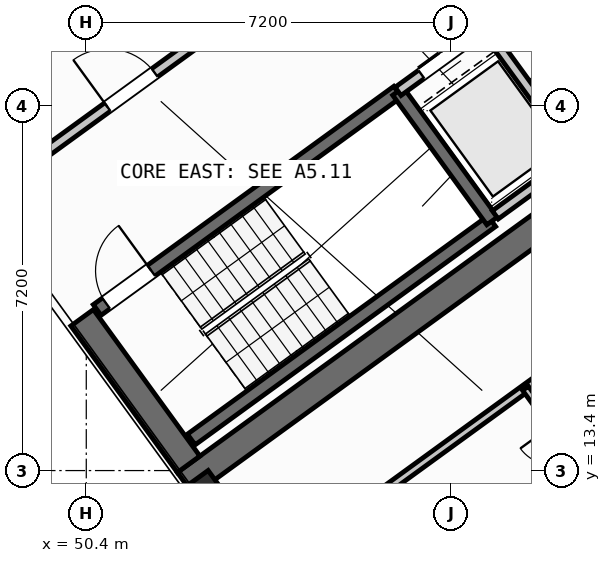
"""IFC4 building model, lengths in metres.
Left out: names, types, materials, properties, quantities, classifications, styles, units other than length and angle.
Written with IfcOpenShell. Run it as: python <this file> out.ifc"""

import sys

from ifc_helpers import new_model, si_unit, direction, frame, frame_2d, origin, origin_2d, place, context, subcontext, project, spatial, rectangle, hollow_rectangle, extrude, source, transform, mapped, element, fill, save


model = new_model("IFC4")
c1 = context("Model", 3, precision=1e-05, world=origin(), true_north=direction((0.0, 1.0)))
c2 = subcontext(c1, "Body", "Model", "MODEL_VIEW")
j1 = project(units=[si_unit("LENGTHUNIT", "METRE"), si_unit("PLANEANGLEUNIT", "RADIAN")], contexts=[c1])
p1 = place(None, origin())
s1 = spatial("IfcSite", under=j1, at=p1, CompositionType="ELEMENT")
p2 = place(p1, origin())
s2 = spatial("IfcBuilding", under=s1, at=p2, CompositionType="ELEMENT")
p3 = place(p2, frame((0.0, 0.0, 132.6)))
s3 = spatial("IfcBuildingStorey", under=s2, at=p3, CompositionType="ELEMENT", Elevation=132.6)
p4 = place(p3, frame((52.359, 13.14, 0.0), z_axis=(0.0, 0.0, 1.0), x_axis=(0.809014896919, 0.587788139183, 0.0)))
e1 = element("IfcWall", 1, at=p4, inside=s3, PredefinedType="SHEAR", context=c2, shape_type="SweptSolid", body=[
    extrude(rectangle(XDim=12.34, YDim=0.55, at=frame_2d((6.17, 0.0))), origin(), (0.0, 0.0, 1.0), 3.32),
])
p5 = place(p3, frame((52.42, 13.524, 0.0), z_axis=(0.0, 0.0, 1.0), x_axis=(-0.587802113096, 0.809004744015, 0.0)))
e2 = element("IfcWall", 2, at=p5, inside=s3, PredefinedType="SHEAR", context=c2, shape_type="SweptSolid", body=[
    extrude(rectangle(XDim=3.575, YDim=0.55, at=frame_2d((1.788, 0.0))), origin(), (0.0, 0.0, 1.0), 3.32),
])
m1 = source(origin(), c2, "Body", "SweptSolid", [
    extrude(hollow_rectangle(XDim=0.9, YDim=0.9, WallThickness=0.036, at=origin_2d()), origin(), (0.0, 0.0, 1.0), 3.6),
])
p6 = place(p3, frame((52.705, 12.773, 0.0), z_axis=(0.0, 0.0, 1.0), x_axis=(0.809016994375, 0.587785252292, 0.0)))
e3 = element("IfcColumn", 3, at=p6, inside=s3, PredefinedType="COLUMN", context=c2, shape_type="MappedRepresentation", body=[
    mapped(m1, transform((0.0, 0.0, 0.0), scale=1.0)),
])
p7 = place(p3, frame((58.455, 35.484, 0.0), z_axis=(0.0, 0.0, 1.0), x_axis=(0.587783625747, -0.809018176127, 0.0)))
e4 = element("IfcWall", 4, at=p7, inside=s3, PredefinedType="STANDARD", context=c2, shape_type="SweptSolid", body=[
    extrude(rectangle(XDim=21.587, YDim=0.32, at=frame_2d((10.794, 0.0))), origin(), (0.0, 0.0, 1.0), 2.745),
])
p8 = place(p7, frame((1.475, 0.0, 0.8)))
e5 = element("IfcOpeningElement", 5, at=p8, cuts=e4, PredefinedType="OPENING", context=c2, shape_type="SweptSolid", body=[
    extrude(rectangle(XDim=2.1, YDim=1.55, at=frame_2d((1.05, 0.775))), frame((0.0, 0.17, 0.0), z_axis=(0.0, -1.0, 0.0), x_axis=(1.0, 0.0, 0.0)), (0.0, 0.0, 1.0), 0.34),
])
p9 = place(p7, frame((5.13, 0.0, 0.85)))
e6 = element("IfcOpeningElement", 6, at=p9, cuts=e4, PredefinedType="OPENING", context=c2, shape_type="SweptSolid", body=[
    extrude(rectangle(XDim=1.5, YDim=1.5, at=frame_2d((0.75, 0.75))), frame((0.0, 0.17, 0.0), z_axis=(0.0, -1.0, 0.0), x_axis=(1.0, 0.0, 0.0)), (0.0, 0.0, 1.0), 0.34),
])
p10 = place(p7, frame((8.929, 0.0, 0.85)))
e7 = element("IfcOpeningElement", 7, at=p10, cuts=e4, PredefinedType="OPENING", context=c2, shape_type="SweptSolid", body=[
    extrude(rectangle(XDim=1.5, YDim=1.5, at=frame_2d((0.75, 0.75))), frame((0.0, 0.17, 0.0), z_axis=(0.0, -1.0, 0.0), x_axis=(1.0, 0.0, 0.0)), (0.0, 0.0, 1.0), 0.34),
])
p11 = place(p7, frame((17.581, 0.0, 0.95)))
e8 = element("IfcOpeningElement", 8, at=p11, cuts=e4, PredefinedType="OPENING", context=c2, shape_type="SweptSolid", body=[
    extrude(rectangle(XDim=1.2, YDim=1.4, at=frame_2d((0.6, 0.7))), frame((0.0, 0.17, 0.0), z_axis=(0.0, -1.0, 0.0), x_axis=(1.0, 0.0, 0.0)), (0.0, 0.0, 1.0), 0.34),
])
p12 = place(p3, frame((71.098, 17.731, 0.0), z_axis=(0.0, 0.0, 1.0), x_axis=(-0.809021120468, -0.587779573171, 0.0)))
e9 = element("IfcWall", 9, at=p12, inside=s3, PredefinedType="STANDARD", context=c2, shape_type="SweptSolid", body=[
    extrude(rectangle(XDim=17.588, YDim=0.32, at=frame_2d((8.794, 0.0))), origin(), (0.0, 0.0, 1.0), 3.32),
])
p13 = place(p12, frame((1.624, 0.0, 0.0)))
e10 = element("IfcOpeningElement", 10, at=p13, cuts=e9, PredefinedType="OPENING", context=c2, shape_type="SweptSolid", body=[
    extrude(rectangle(XDim=1.05, YDim=2.15, at=frame_2d((0.525, 1.075))), frame((0.0, 0.17, 0.0), z_axis=(0.0, -1.0, 0.0), x_axis=(1.0, 0.0, 0.0)), (0.0, 0.0, 1.0), 0.34),
])
p14 = place(p12, frame((4.104, 0.0, 1.0)))
e11 = element("IfcOpeningElement", 11, at=p14, cuts=e9, PredefinedType="OPENING", context=c2, shape_type="SweptSolid", body=[
    extrude(rectangle(XDim=0.9, YDim=1.25, at=frame_2d((0.45, 0.625))), frame((0.0, 0.17, 0.0), z_axis=(0.0, -1.0, 0.0), x_axis=(1.0, 0.0, 0.0)), (0.0, 0.0, 1.0), 0.34),
])
p15 = place(p12, frame((7.879, 0.0, 0.85)))
e12 = element("IfcOpeningElement", 12, at=p15, cuts=e9, PredefinedType="OPENING", context=c2, shape_type="SweptSolid", body=[
    extrude(rectangle(XDim=1.8, YDim=1.5, at=frame_2d((0.9, 0.75))), frame((0.0, 0.17, 0.0), z_axis=(0.0, -1.0, 0.0), x_axis=(1.0, 0.0, 0.0)), (0.0, 0.0, 1.0), 0.34),
])
p16 = place(p12, frame((12.849, 0.0, 0.85)))
e13 = element("IfcOpeningElement", 13, at=p16, cuts=e9, PredefinedType="OPENING", context=c2, shape_type="SweptSolid", body=[
    extrude(rectangle(XDim=1.8, YDim=1.5, at=frame_2d((0.9, 0.75))), frame((0.0, 0.17, 0.0), z_axis=(0.0, -1.0, 0.0), x_axis=(1.0, 0.0, 0.0)), (0.0, 0.0, 1.0), 0.34),
])
p17 = place(p3, frame((52.472, 14.013, 0.0), z_axis=(0.0, 0.0, 1.0), x_axis=(0.809028366311, 0.587769599847, 0.0)))
e14 = element("IfcWall", 14, at=p17, inside=s3, PredefinedType="SHEAR", context=c2, shape_type="SweptSolid", body=[
    extrude(rectangle(XDim=7.33, YDim=0.26, at=frame_2d((3.665, 0.0))), origin(), (0.0, 0.0, 1.0), 3.32),
])
p18 = place(p3, frame((50.615, 16.57, 0.0), z_axis=(0.0, 0.0, 1.0), x_axis=(0.809028366311, 0.587769599847, 0.0)))
e15 = element("IfcWall", 15, at=p18, inside=s3, PredefinedType="SHEAR", context=c2, shape_type="SweptSolid", body=[
    extrude(rectangle(XDim=7.33, YDim=0.26, at=frame_2d((3.665, 0.0))), origin(), (0.0, 0.0, 1.0), 3.32),
])
p19 = place(p18, frame((0.22, 0.0, 0.0)))
e16 = element("IfcOpeningElement", 16, at=p19, cuts=e15, PredefinedType="OPENING", context=c2, shape_type="SweptSolid", body=[
    extrude(rectangle(XDim=1.1, YDim=2.1, at=frame_2d((0.55, 1.05))), frame((0.0, 0.14, 0.0), z_axis=(0.0, -1.0, 0.0), x_axis=(1.0, 0.0, 0.0)), (0.0, 0.0, 1.0), 0.28),
])
p20 = place(p3, frame((58.41, 18.327, 0.0), z_axis=(0.0, 0.0, 1.0), x_axis=(-0.58776738483, 0.809029975545, 0.0)))
e17 = element("IfcWall", 17, at=p20, inside=s3, PredefinedType="SHEAR", context=c2, shape_type="SweptSolid", body=[
    extrude(rectangle(XDim=3.16, YDim=0.26, at=frame_2d((1.58, 0.0))), origin(), (0.0, 0.0, 1.0), 3.32),
])
p21 = place(p3, frame((47.065, 21.407, 0.0), z_axis=(0.0, 0.0, 1.0), x_axis=(0.809032984992, 0.587763242466, 0.0)))
e18 = element("IfcWall", 18, at=p21, inside=s3, PredefinedType="STANDARD", context=c2, shape_type="SweptSolid", body=[
    extrude(rectangle(XDim=3.448, YDim=0.2, at=frame_2d((1.724, 0.0))), origin(), (0.0, 0.0, 1.0), 3.31),
])
p22 = place(p21, frame((0.458, 0.0, 0.0)))
e19 = element("IfcOpeningElement", 19, at=p22, cuts=e18, PredefinedType="OPENING", context=c2, shape_type="SweptSolid", body=[
    extrude(rectangle(XDim=1.3, YDim=2.2, at=frame_2d((0.65, 1.1))), frame((0.0, 0.11, 0.0), z_axis=(0.0, -1.0, 0.0), x_axis=(1.0, 0.0, 0.0)), (0.0, 0.0, 1.0), 0.22),
])
p23 = place(p3, frame((48.758, 19.077, 0.0), z_axis=(0.0, 0.0, 1.0), x_axis=(0.809005065155, 0.587801671104, 0.0)))
e20 = element("IfcWall", 20, at=p23, inside=s3, PredefinedType="STANDARD", context=c2, shape_type="SweptSolid", body=[
    extrude(rectangle(XDim=5.768, YDim=0.2, at=frame_2d((2.884, 0.0))), origin(), (0.0, 0.0, 1.0), 3.31),
])
p24 = place(p23, frame((2.548, 0.0, 0.0)))
e21 = element("IfcOpeningElement", 21, at=p24, cuts=e20, PredefinedType="OPENING", context=c2, shape_type="SweptSolid", body=[
    extrude(rectangle(XDim=1.15, YDim=2.1, at=frame_2d((0.575, 1.05))), frame((0.0, 0.11, 0.0), z_axis=(0.0, -1.0, 0.0), x_axis=(1.0, 0.0, 0.0)), (0.0, 0.0, 1.0), 0.22),
])
p25 = place(p3, frame((56.553, 20.884, 0.0), z_axis=(0.0, 0.0, 1.0), x_axis=(0.809023564264, 0.58777620951, 0.0)))
e22 = element("IfcWall", 22, at=p25, inside=s3, PredefinedType="STANDARD", context=c2, shape_type="SweptSolid", body=[
    extrude(rectangle(XDim=3.818, YDim=0.2, at=frame_2d((1.909, 0.0))), origin(), (0.0, 0.0, 1.0), 3.31),
])
p26 = place(p25, frame((0.57, 0.0, 0.0)))
e23 = element("IfcOpeningElement", 23, at=p26, cuts=e22, PredefinedType="OPENING", context=c2, shape_type="SweptSolid", body=[
    extrude(rectangle(XDim=1.1, YDim=2.15, at=frame_2d((0.55, 1.075))), frame((0.0, 0.11, 0.0), z_axis=(0.0, -1.0, 0.0), x_axis=(1.0, 0.0, 0.0)), (0.0, 0.0, 1.0), 0.22),
])
p27 = place(p25, frame((2.65, 0.0, 0.0)))
e24 = element("IfcOpeningElement", 24, at=p27, cuts=e22, PredefinedType="OPENING", context=c2, shape_type="SweptSolid", body=[
    extrude(rectangle(XDim=0.86, YDim=2.05, at=frame_2d((0.43, 1.025))), frame((0.0, 0.11, 0.0), z_axis=(0.0, -1.0, 0.0), x_axis=(1.0, 0.0, 0.0)), (0.0, 0.0, 1.0), 0.22),
])
p28 = place(p3, frame((60.067, 19.655, 0.0), z_axis=(0.0, 0.0, 1.0), x_axis=(-0.587800520745, 0.809005900975, 0.0)))
e25 = element("IfcWall", 25, at=p28, inside=s3, PredefinedType="STANDARD", context=c2, shape_type="SweptSolid", body=[
    extrude(rectangle(XDim=2.66, YDim=0.2, at=frame_2d((1.33, 0.0))), origin(), (0.0, 0.0, 1.0), 3.31),
])
p29 = place(p3, frame((58.472, 18.447, 0.0), z_axis=(0.0, 0.0, 1.0), x_axis=(0.809018631237, 0.587782999339, 0.0)))
e26 = element("IfcWall", 26, at=p29, inside=s3, PredefinedType="STANDARD", context=c2, shape_type="SweptSolid", body=[
    extrude(rectangle(XDim=3.698, YDim=0.2, at=frame_2d((1.849, 0.0))), origin(), (0.0, 0.0, 1.0), 3.31),
])
p30 = place(p3, frame((53.705, 11.126, 0.0), z_axis=(0.0, 0.0, 1.0), x_axis=(0.809014504436, 0.587788679384, 0.0)))
e27 = element("IfcWall", 27, at=p30, inside=s3, PredefinedType="PARTITIONING", context=c2, shape_type="SweptSolid", body=[
    extrude(rectangle(XDim=14.67, YDim=0.16, at=frame_2d((7.335, 0.0))), origin(), (0.0, 0.0, 1.0), 3.31),
])
p31 = place(p30, frame((10.2, 0.0, 0.0)))
e28 = element("IfcOpeningElement", 28, at=p31, cuts=e27, PredefinedType="OPENING", context=c2, shape_type="SweptSolid", body=[
    extrude(rectangle(XDim=1.0, YDim=2.1, at=frame_2d((0.5, 1.05))), frame((0.0, 0.09, 0.0), z_axis=(0.0, -1.0, 0.0), x_axis=(1.0, 0.0, 0.0)), (0.0, 0.0, 1.0), 0.18),
])
p32 = place(p3, frame((56.249, 9.785, 0.0), z_axis=(0.0, 0.0, 1.0), x_axis=(0.809011747655, 0.587792473715, 0.0)))
e29 = element("IfcWall", 29, at=p32, inside=s3, PredefinedType="PLUMBINGWALL", context=c2, shape_type="SweptSolid", body=[
    extrude(rectangle(XDim=13.4, YDim=0.14, at=frame_2d((6.7, 0.0))), origin(), (0.0, 0.0, 1.0), 3.31),
])
p33 = place(p32, frame((8.94, 0.0, 0.0)))
e30 = element("IfcOpeningElement", 30, at=p33, cuts=e29, PredefinedType="OPENING", context=c2, shape_type="SweptSolid", body=[
    extrude(rectangle(XDim=0.92, YDim=2.08, at=frame_2d((0.46, 1.04))), frame((0.0, 0.08, 0.0), z_axis=(0.0, -1.0, 0.0), x_axis=(1.0, 0.0, 0.0)), (0.0, 0.0, 1.0), 0.16),
])
p34 = place(p3, frame((60.585, 12.936, 0.0), z_axis=(0.0, 0.0, 1.0), x_axis=(-0.587772116736, 0.809026537752, 0.0)))
e31 = element("IfcWall", 31, at=p34, inside=s3, PredefinedType="PLUMBINGWALL", context=c2, shape_type="SweptSolid", body=[
    extrude(rectangle(XDim=2.58, YDim=0.14, at=frame_2d((1.29, 0.0))), origin(), (0.0, 0.0, 1.0), 3.31),
])
p35 = place(p34, frame((0.9, 0.0, 0.0)))
e32 = element("IfcOpeningElement", 32, at=p35, cuts=e31, PredefinedType="OPENING", context=c2, shape_type="SweptSolid", body=[
    extrude(rectangle(XDim=0.78, YDim=2.05, at=frame_2d((0.39, 1.025))), frame((0.0, 0.08, 0.0), z_axis=(0.0, -1.0, 0.0), x_axis=(1.0, 0.0, 0.0)), (0.0, 0.0, 1.0), 0.16),
])
m2 = source(origin(), c2, "Body", "SweptSolid", [
    extrude(rectangle(XDim=1.1, YDim=2.1, at=frame_2d((0.55, 1.05))), frame((0.0, 0.025, 0.0), z_axis=(0.0, -1.0, 0.0), x_axis=(1.0, 0.0, 0.0)), (0.0, 0.0, 1.0), 0.05),
])
p36 = place(p19, origin())
e33 = element("IfcDoor", 33, at=p36, inside=s3, OperationType="SINGLE_SWING_RIGHT", PredefinedType="DOOR", context=c2, shape_type="MappedRepresentation", body=[
    mapped(m2, transform((0.0, 0.0, 0.0), scale=1.0)),
])
fill(e16, e33)
m3 = source(origin(), c2, "Body", "SweptSolid", [
    extrude(rectangle(XDim=1.15, YDim=2.1, at=frame_2d((0.575, 1.05))), frame((0.0, 0.025, 0.0), z_axis=(0.0, -1.0, 0.0), x_axis=(1.0, 0.0, 0.0)), (0.0, 0.0, 1.0), 0.05),
])
p37 = place(p24, origin())
e34 = element("IfcDoor", 34, at=p37, inside=s3, OperationType="SINGLE_SWING_LEFT", PredefinedType="DOOR", context=c2, shape_type="MappedRepresentation", body=[
    mapped(m3, transform((0.0, 0.0, 0.0), scale=1.0)),
])
fill(e21, e34)
m4 = source(origin(), c2, "Body", "SweptSolid", [
    extrude(rectangle(XDim=1.1, YDim=2.15, at=frame_2d((0.55, 1.075))), frame((0.0, 0.025, 0.0), z_axis=(0.0, -1.0, 0.0), x_axis=(1.0, 0.0, 0.0)), (0.0, 0.0, 1.0), 0.05),
])
p38 = place(p26, origin())
e35 = element("IfcDoor", 35, at=p38, inside=s3, OperationType="DOUBLE_DOOR_SLIDING", PredefinedType="DOOR", context=c2, shape_type="MappedRepresentation", body=[
    mapped(m4, transform((0.0, 0.0, 0.0), scale=1.0)),
])
fill(e23, e35)
save(model, sys.argv[1])
